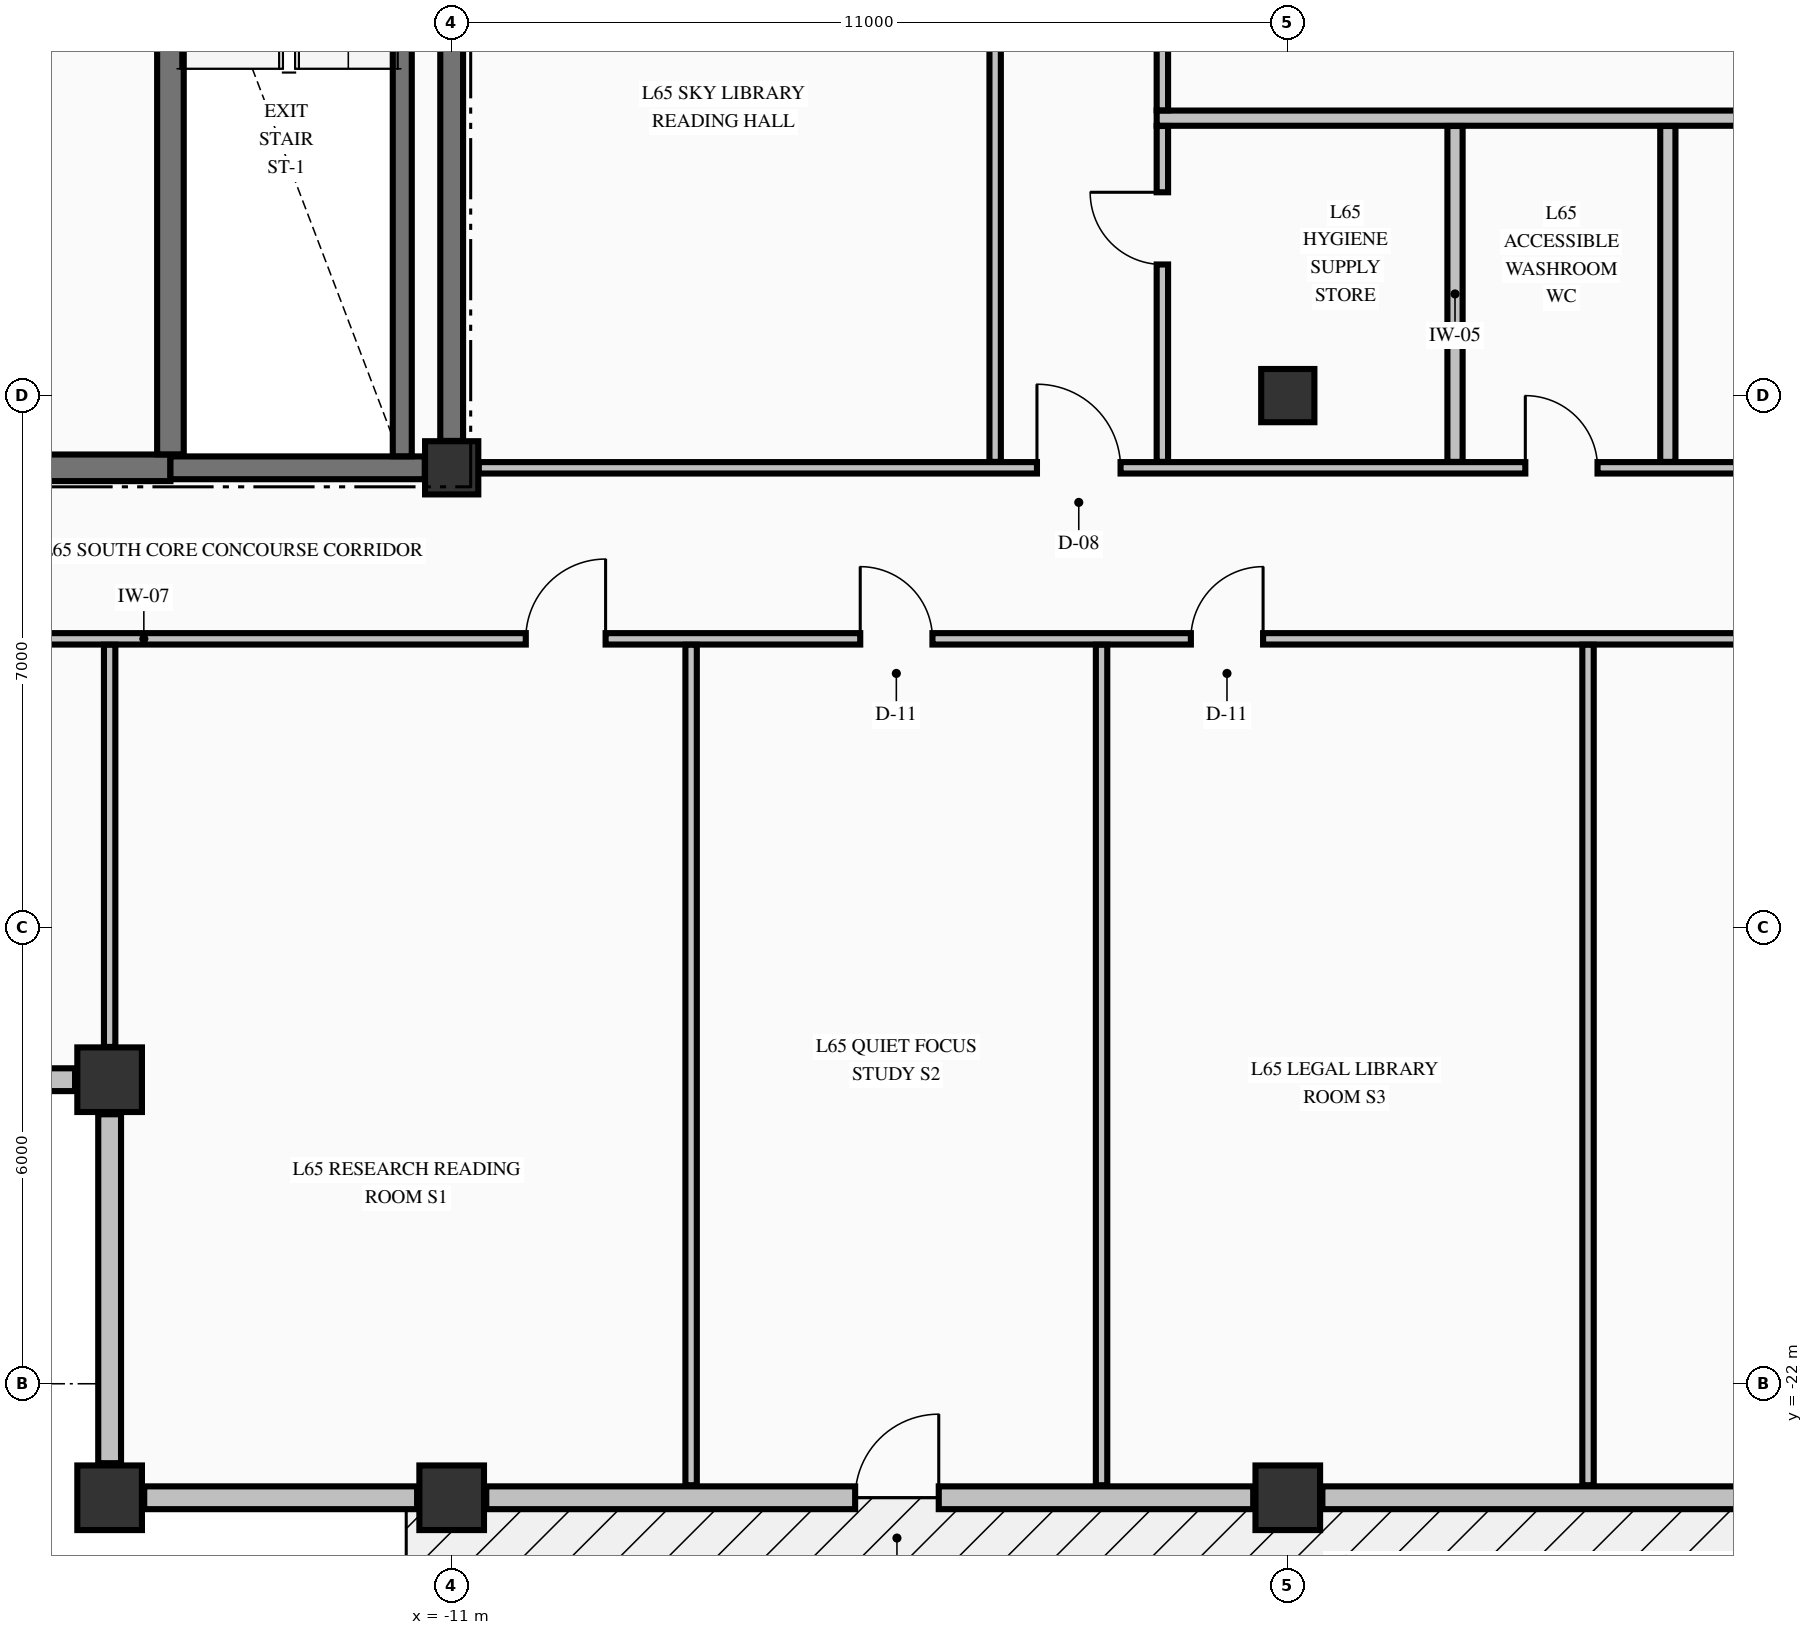
"""IFC4 building model, lengths in metres.
Left out: names, types, materials, properties, quantities, classifications, styles, units other than length and angle.
Written with IfcOpenShell. Run it as: python <this file> out.ifc"""

import sys

from ifc_helpers import new_model, si_unit, direction, frame, frame_2d, origin, origin_2d, place, context, subcontext, project, spatial, rectangle, extrude, element, fill, save


model = new_model("IFC4")
c1 = context("Model", 3, precision=1e-05, world=origin(), true_north=direction((0.0, 1.0)))
c2 = subcontext(c1, "Body", "Model", "MODEL_VIEW")
j1 = project(units=[si_unit("LENGTHUNIT", "METRE"), si_unit("PLANEANGLEUNIT", "RADIAN")], contexts=[c1])
p1 = place(None, origin())
s1 = spatial("IfcSite", under=j1, at=p1, CompositionType="ELEMENT")
p2 = place(p1, origin())
s2 = spatial("IfcBuilding", under=s1, at=p2, CompositionType="ELEMENT")
p3 = place(p2, frame((0.0, 0.0, 246.2)))
s3 = spatial("IfcBuildingStorey", under=s2, at=p3, CompositionType="ELEMENT", Elevation=246.2)
for number, where, z_axis, x_axis in (
    (1, (-15.5, -23.5, -0.25), (0.0, 0.0, 1.0), (1.0, 0.0, 0.0)),
    (2, (-11.0, -23.5, -0.25), (0.0, 0.0, 1.0), (1.0, 0.0, 0.0)),
    (3, (0.0, -23.5, -0.25), (0.0, 0.0, 1.0), (1.0, 0.0, 0.0)),
    (4, (-15.5, -18.0, -0.25), (0.0, 0.0, 1.0), (1.0, 0.0, 0.0)),
):
    element("IfcColumn", number, at=place(p3, frame(where, z_axis=z_axis, x_axis=x_axis)), inside=s3, PredefinedType="COLUMN", context=c2, shape_type="SweptSolid", body=[
        extrude(rectangle(XDim=0.85, YDim=0.85, at=origin_2d()), origin(), (0.0, 0.0, 1.0), 3.055),
    ])
for number, where, z_axis, x_axis in (
    (5, (-11.0, -9.95, -0.25), (0.0, 0.0, 1.0), (1.0, 0.0, 0.0)),
    (6, (0.0, -9.0, -0.25), (0.0, 0.0, 1.0), (1.0, 0.0, 0.0)),
):
    element("IfcColumn", number, at=place(p3, frame(where, z_axis=z_axis, x_axis=x_axis)), inside=s3, PredefinedType="COLUMN", context=c2, shape_type="SweptSolid", body=[
        extrude(rectangle(XDim=0.7, YDim=0.7, at=origin_2d()), origin(), (0.0, 0.0, 1.0), 3.055),
    ])
for number, where, z_axis, x_axis in (
    (7, (-20.545, -18.0, 0.0), (0.0, 0.0, 1.0), (1.0, 0.0, 0.0)),
    (8, (-15.5, -18.455, 0.0), (0.0, 0.0, 1.0), (0.0, -1.0, 0.0)),
):
    element("IfcWall", number, at=place(p3, frame(where, z_axis=z_axis, x_axis=x_axis)), inside=s3, PredefinedType="STANDARD", context=c2, shape_type="SweptSolid", body=[
        extrude(rectangle(XDim=4.59, YDim=0.3, at=frame_2d((2.295, 0.0))), origin(), (0.0, 0.0, 1.0), 2.197),
    ])
p4 = place(p3, frame((-15.045, -23.5, 0.0), z_axis=(0.0, 0.0, 1.0), x_axis=(1.0, 0.0, 0.0)))
e9 = element("IfcWall", 9, at=p4, inside=s3, PredefinedType="STANDARD", context=c2, shape_type="SweptSolid", body=[
    extrude(rectangle(XDim=3.59, YDim=0.3, at=frame_2d((1.795, 0.0))), origin(), (0.0, 0.0, 1.0), 2.197),
])
p5 = place(p3, frame((-10.545, -23.5, 0.0), z_axis=(0.0, 0.0, 1.0), x_axis=(1.0, 0.0, 0.0)))
e10 = element("IfcWall", 10, at=p5, inside=s3, PredefinedType="STANDARD", context=c2, shape_type="SweptSolid", body=[
    extrude(rectangle(XDim=10.09, YDim=0.3, at=frame_2d((5.045, 0.0))), origin(), (0.0, 0.0, 1.0), 2.197),
])
p6 = place(p5, frame((4.853, 0.0, 0.0)))
e11 = element("IfcOpeningElement", 11, at=p6, cuts=e10, PredefinedType="OPENING", context=c2, shape_type="SweptSolid", body=[
    extrude(rectangle(XDim=1.1, YDim=2.05, at=frame_2d((0.55, 1.025))), frame((0.0, 0.16, 0.0), z_axis=(0.0, -1.0, 0.0), x_axis=(1.0, 0.0, 0.0)), (0.0, 0.0, 1.0), 0.32),
])
p7 = place(p3, frame((0.455, -23.5, 0.0), z_axis=(0.0, 0.0, 1.0), x_axis=(1.0, 0.0, 0.0)))
e12 = element("IfcWall", 12, at=p7, inside=s3, PredefinedType="STANDARD", context=c2, shape_type="SweptSolid", body=[
    extrude(rectangle(XDim=10.09, YDim=0.3, at=frame_2d((5.045, 0.0))), origin(), (0.0, 0.0, 1.0), 2.197),
])
p8 = place(p3, frame((-19.646, -9.95, 0.0), z_axis=(0.0, 0.0, 1.0), x_axis=(1.0, 0.0, 0.0)))
e13 = element("IfcWall", 13, at=p8, inside=s3, PredefinedType="SHEAR", context=c2, shape_type="SweptSolid", body=[
    extrude(rectangle(XDim=4.946, YDim=0.35, at=frame_2d((2.473, 0.0))), origin(), (0.0, 0.0, 1.0), 2.805),
])
p9 = place(p8, frame((0.821, 0.0, 0.0)))
e14 = element("IfcOpeningElement", 14, at=p9, cuts=e13, PredefinedType="OPENING", context=c2, shape_type="SweptSolid", body=[
    extrude(rectangle(XDim=1.05, YDim=2.15, at=frame_2d((0.525, 1.075))), frame((0.0, 0.185, 0.0), z_axis=(0.0, -1.0, 0.0), x_axis=(1.0, 0.0, 0.0)), (0.0, 0.0, 1.0), 0.37),
])
p10 = place(p3, frame((-14.7, -9.95, 0.0), z_axis=(0.0, 0.0, 1.0), x_axis=(1.0, 0.0, 0.0)))
e15 = element("IfcWall", 15, at=p10, inside=s3, PredefinedType="SHEAR", context=c2, shape_type="SweptSolid", body=[
    extrude(rectangle(XDim=3.346, YDim=0.3, at=frame_2d((1.673, 0.0))), origin(), (0.0, 0.0, 1.0), 2.805),
])
p11 = place(p3, frame((-20.075, -12.2, 0.0), z_axis=(0.0, 0.0, 1.0), x_axis=(1.0, 0.0, 0.0)))
e16 = element("IfcWall", 16, at=p11, inside=s3, PredefinedType="PARTITIONING", context=c2, shape_type="SweptSolid", body=[
    extrude(rectangle(XDim=45.91, YDim=0.15, at=frame_2d((22.955, 0.0))), origin(), (0.0, 0.0, 1.0), 2.805),
])
p12 = place(p11, frame((10.05, 0.0, 0.0)))
e17 = element("IfcOpeningElement", 17, at=p12, cuts=e16, PredefinedType="OPENING", context=c2, shape_type="SweptSolid", body=[
    extrude(rectangle(XDim=1.05, YDim=2.15, at=frame_2d((0.525, 1.075))), frame((0.0, 0.085, 0.0), z_axis=(0.0, -1.0, 0.0), x_axis=(1.0, 0.0, 0.0)), (0.0, 0.0, 1.0), 0.17),
])
p13 = place(p11, frame((14.45, 0.0, 0.0)))
e18 = element("IfcOpeningElement", 18, at=p13, cuts=e16, PredefinedType="OPENING", context=c2, shape_type="SweptSolid", body=[
    extrude(rectangle(XDim=0.95, YDim=2.15, at=frame_2d((0.475, 1.075))), frame((0.0, 0.085, 0.0), z_axis=(0.0, -1.0, 0.0), x_axis=(1.0, 0.0, 0.0)), (0.0, 0.0, 1.0), 0.17),
])
p14 = place(p11, frame((18.8, 0.0, 0.0)))
e19 = element("IfcOpeningElement", 19, at=p14, cuts=e16, PredefinedType="OPENING", context=c2, shape_type="SweptSolid", body=[
    extrude(rectangle(XDim=0.95, YDim=2.15, at=frame_2d((0.475, 1.075))), frame((0.0, 0.085, 0.0), z_axis=(0.0, -1.0, 0.0), x_axis=(1.0, 0.0, 0.0)), (0.0, 0.0, 1.0), 0.17),
])
p15 = place(p11, frame((28.1, 0.0, 0.0)))
e20 = element("IfcOpeningElement", 20, at=p15, cuts=e16, PredefinedType="OPENING", context=c2, shape_type="SweptSolid", body=[
    extrude(rectangle(XDim=1.05, YDim=2.15, at=frame_2d((0.525, 1.075))), frame((0.0, 0.085, 0.0), z_axis=(0.0, -1.0, 0.0), x_axis=(1.0, 0.0, 0.0)), (0.0, 0.0, 1.0), 0.17),
])
p16 = place(p11, frame((36.08, 0.0, 0.0)))
e21 = element("IfcOpeningElement", 21, at=p16, cuts=e16, PredefinedType="OPENING", context=c2, shape_type="SweptSolid", body=[
    extrude(rectangle(XDim=0.95, YDim=2.15, at=frame_2d((0.475, 1.075))), frame((0.0, 0.085, 0.0), z_axis=(0.0, -1.0, 0.0), x_axis=(1.0, 0.0, 0.0)), (0.0, 0.0, 1.0), 0.17),
])
p17 = place(p3, frame((-10.644, -9.95, 0.0), z_axis=(0.0, 0.0, 1.0), x_axis=(1.0, 0.0, 0.0)))
e22 = element("IfcWall", 22, at=p17, inside=s3, PredefinedType="PARTITIONING", context=c2, shape_type="SweptSolid", body=[
    extrude(rectangle(XDim=21.288, YDim=0.15, at=frame_2d((10.644, 0.0))), origin(), (0.0, 0.0, 1.0), 2.805),
])
p18 = place(p17, frame((7.344, 0.0, 0.0)))
e23 = element("IfcOpeningElement", 23, at=p18, cuts=e22, PredefinedType="OPENING", context=c2, shape_type="SweptSolid", body=[
    extrude(rectangle(XDim=1.1, YDim=2.15, at=frame_2d((0.55, 1.075))), frame((0.0, 0.085, 0.0), z_axis=(0.0, -1.0, 0.0), x_axis=(1.0, 0.0, 0.0)), (0.0, 0.0, 1.0), 0.17),
])
p19 = place(p17, frame((13.769, 0.0, 0.0)))
e24 = element("IfcOpeningElement", 24, at=p19, cuts=e22, PredefinedType="OPENING", context=c2, shape_type="SweptSolid", body=[
    extrude(rectangle(XDim=0.95, YDim=2.15, at=frame_2d((0.475, 1.075))), frame((0.0, 0.085, 0.0), z_axis=(0.0, -1.0, 0.0), x_axis=(1.0, 0.0, 0.0)), (0.0, 0.0, 1.0), 0.17),
])
p20 = place(p17, frame((17.994, 0.0, 0.0)))
e25 = element("IfcOpeningElement", 25, at=p20, cuts=e22, PredefinedType="OPENING", context=c2, shape_type="SweptSolid", body=[
    extrude(rectangle(XDim=0.9, YDim=2.15, at=frame_2d((0.45, 1.075))), frame((0.0, 0.085, 0.0), z_axis=(0.0, -1.0, 0.0), x_axis=(1.0, 0.0, 0.0)), (0.0, 0.0, 1.0), 0.17),
])
p21 = place(p3, frame((-1.725, -5.35, 0.0), z_axis=(0.0, 0.0, 1.0), x_axis=(1.0, 0.0, 0.0)))
e26 = element("IfcWall", 26, at=p21, inside=s3, PredefinedType="PARTITIONING", context=c2, shape_type="SweptSolid", body=[
    extrude(rectangle(XDim=12.572, YDim=0.2, at=frame_2d((6.286, 0.0))), origin(), (0.0, 0.0, 1.0), 2.805),
])
p22 = place(p3, frame((-14.7, -9.773, 0.0), z_axis=(0.0, 0.0, 1.0), x_axis=(0.0, 1.0, 0.0)))
e27 = element("IfcWall", 27, at=p22, inside=s3, PredefinedType="SHEAR", context=c2, shape_type="SweptSolid", body=[
    extrude(rectangle(XDim=9.371, YDim=0.35, at=frame_2d((4.686, 0.0))), origin(), (0.0, 0.0, 1.0), 2.805),
])
p23 = place(p3, frame((-11.65, -9.798, 0.0), z_axis=(0.0, 0.0, 1.0), x_axis=(0.0, 1.0, 0.0)))
e28 = element("IfcWall", 28, at=p23, inside=s3, PredefinedType="SOLIDWALL", context=c2, shape_type="SweptSolid", body=[
    extrude(rectangle(XDim=9.396, YDim=0.25, at=frame_2d((4.698, 0.0))), origin(), (0.0, 0.0, 1.0), 2.805),
])
p24 = place(p3, frame((-11.0, -9.596, 0.0), z_axis=(0.0, 0.0, 1.0), x_axis=(0.0, 1.0, 0.0)))
e29 = element("IfcWall", 29, at=p24, inside=s3, PredefinedType="SHEAR", context=c2, shape_type="SweptSolid", body=[
    extrude(rectangle(XDim=9.242, YDim=0.3, at=frame_2d((4.621, 0.0))), origin(), (0.0, 0.0, 1.0), 2.805),
])
p25 = place(p3, frame((-15.5, -17.569, 0.0), z_axis=(0.0, 0.0, 1.0), x_axis=(0.0, 1.0, 0.0)))
e30 = element("IfcWall", 30, at=p25, inside=s3, PredefinedType="PARTITIONING", context=c2, shape_type="SweptSolid", body=[
    extrude(rectangle(XDim=5.291, YDim=0.15, at=frame_2d((2.646, 0.0))), origin(), (0.0, 0.0, 1.0), 2.805),
])
p26 = place(p3, frame((-7.85, -23.335, 0.0), z_axis=(0.0, 0.0, 1.0), x_axis=(0.0, 1.0, 0.0)))
e31 = element("IfcWall", 31, at=p26, inside=s3, PredefinedType="PARTITIONING", context=c2, shape_type="SweptSolid", body=[
    extrude(rectangle(XDim=11.057, YDim=0.15, at=frame_2d((5.528, 0.0))), origin(), (0.0, 0.0, 1.0), 2.805),
])
p27 = place(p3, frame((-3.85, -9.872, 0.0), z_axis=(0.0, 0.0, 1.0), x_axis=(0.0, 1.0, 0.0)))
e32 = element("IfcWall", 32, at=p27, inside=s3, PredefinedType="PARTITIONING", context=c2, shape_type="SweptSolid", body=[
    extrude(rectangle(XDim=9.544, YDim=0.15, at=frame_2d((4.772, 0.0))), origin(), (0.0, 0.0, 1.0), 2.805),
])
p28 = place(p3, frame((-2.45, -23.335, 0.0), z_axis=(0.0, 0.0, 1.0), x_axis=(0.0, 1.0, 0.0)))
e33 = element("IfcWall", 33, at=p28, inside=s3, PredefinedType="PARTITIONING", context=c2, shape_type="SweptSolid", body=[
    extrude(rectangle(XDim=11.057, YDim=0.15, at=frame_2d((5.528, 0.0))), origin(), (0.0, 0.0, 1.0), 2.805),
])
p29 = place(p3, frame((-1.65, -9.872, 0.0), z_axis=(0.0, 0.0, 1.0), x_axis=(0.0, 1.0, 0.0)))
e34 = element("IfcWall", 34, at=p29, inside=s3, PredefinedType="PARTITIONING", context=c2, shape_type="SweptSolid", body=[
    extrude(rectangle(XDim=4.419, YDim=0.15, at=frame_2d((2.209, 0.0))), origin(), (0.0, 0.0, 1.0), 2.805),
])
p30 = place(p29, frame((2.597, 0.0, 0.0)))
e35 = element("IfcOpeningElement", 35, at=p30, cuts=e34, PredefinedType="OPENING", context=c2, shape_type="SweptSolid", body=[
    extrude(rectangle(XDim=0.95, YDim=2.15, at=frame_2d((0.475, 1.075))), frame((0.0, 0.085, 0.0), z_axis=(0.0, -1.0, 0.0), x_axis=(1.0, 0.0, 0.0)), (0.0, 0.0, 1.0), 0.17),
])
p31 = place(p3, frame((-1.65, -5.247, 0.0), z_axis=(0.0, 0.0, 1.0), x_axis=(0.0, 1.0, 0.0)))
e36 = element("IfcWall", 36, at=p31, inside=s3, PredefinedType="PARTITIONING", context=c2, shape_type="SweptSolid", body=[
    extrude(rectangle(XDim=4.919, YDim=0.15, at=frame_2d((2.459, 0.0))), origin(), (0.0, 0.0, 1.0), 2.805),
])
p32 = place(p3, frame((2.2, -9.872, 0.0), z_axis=(0.0, 0.0, 1.0), x_axis=(0.0, 1.0, 0.0)))
e37 = element("IfcWall", 37, at=p32, inside=s3, PredefinedType="PARTITIONING", context=c2, shape_type="SweptSolid", body=[
    extrude(rectangle(XDim=4.419, YDim=0.2, at=frame_2d((2.209, 0.0))), origin(), (0.0, 0.0, 1.0), 2.805),
])
p33 = place(p3, frame((3.95, -23.335, 0.0), z_axis=(0.0, 0.0, 1.0), x_axis=(0.0, 1.0, 0.0)))
e38 = element("IfcWall", 38, at=p33, inside=s3, PredefinedType="PARTITIONING", context=c2, shape_type="SweptSolid", body=[
    extrude(rectangle(XDim=11.057, YDim=0.15, at=frame_2d((5.528, 0.0))), origin(), (0.0, 0.0, 1.0), 2.805),
])
p34 = place(p3, frame((5.0, -9.872, 0.0), z_axis=(0.0, 0.0, 1.0), x_axis=(0.0, 1.0, 0.0)))
e39 = element("IfcWall", 39, at=p34, inside=s3, PredefinedType="PARTITIONING", context=c2, shape_type="SweptSolid", body=[
    extrude(rectangle(XDim=4.419, YDim=0.2, at=frame_2d((2.209, 0.0))), origin(), (0.0, 0.0, 1.0), 2.805),
])
p35 = place(p6, origin())
e40 = element("IfcDoor", 40, at=p35, inside=s3, OperationType="SINGLE_SWING_RIGHT", PredefinedType="DOOR", context=c2, shape_type="SweptSolid", body=[
    extrude(rectangle(XDim=1.1, YDim=2.05, at=frame_2d((0.55, 1.025))), frame((0.0, 0.025, 0.0), z_axis=(0.0, -1.0, 0.0), x_axis=(1.0, 0.0, 0.0)), (0.0, 0.0, 1.0), 0.05),
])
fill(e11, e40)
p36 = place(p18, origin())
e41 = element("IfcDoor", 41, at=p36, inside=s3, OperationType="SINGLE_SWING_LEFT", PredefinedType="DOOR", context=c2, shape_type="SweptSolid", body=[
    extrude(rectangle(XDim=1.1, YDim=2.15, at=frame_2d((0.55, 1.075))), frame((0.0, 0.025, 0.0), z_axis=(0.0, -1.0, 0.0), x_axis=(1.0, 0.0, 0.0)), (0.0, 0.0, 1.0), 0.05),
])
fill(e23, e41)
p37 = place(p12, origin())
e42 = element("IfcDoor", 42, at=p37, inside=s3, OperationType="SINGLE_SWING_RIGHT", PredefinedType="DOOR", context=c2, shape_type="SweptSolid", body=[
    extrude(rectangle(XDim=1.05, YDim=2.15, at=frame_2d((0.525, 1.075))), frame((0.0, 0.025, 0.0), z_axis=(0.0, -1.0, 0.0), x_axis=(1.0, 0.0, 0.0)), (0.0, 0.0, 1.0), 0.05),
])
fill(e17, e42)
p38 = place(p13, origin())
e43 = element("IfcDoor", 43, at=p38, inside=s3, OperationType="SINGLE_SWING_LEFT", PredefinedType="DOOR", context=c2, shape_type="SweptSolid", body=[
    extrude(rectangle(XDim=0.95, YDim=2.15, at=frame_2d((0.475, 1.075))), frame((0.0, 0.025, 0.0), z_axis=(0.0, -1.0, 0.0), x_axis=(1.0, 0.0, 0.0)), (0.0, 0.0, 1.0), 0.05),
])
fill(e18, e43)
p39 = place(p14, origin())
e44 = element("IfcDoor", 44, at=p39, inside=s3, OperationType="SINGLE_SWING_RIGHT", PredefinedType="DOOR", context=c2, shape_type="SweptSolid", body=[
    extrude(rectangle(XDim=0.95, YDim=2.15, at=frame_2d((0.475, 1.075))), frame((0.0, 0.025, 0.0), z_axis=(0.0, -1.0, 0.0), x_axis=(1.0, 0.0, 0.0)), (0.0, 0.0, 1.0), 0.05),
])
fill(e19, e44)
p40 = place(p30, origin())
e45 = element("IfcDoor", 45, at=p40, inside=s3, OperationType="SINGLE_SWING_RIGHT", PredefinedType="DOOR", context=c2, shape_type="SweptSolid", body=[
    extrude(rectangle(XDim=0.95, YDim=2.15, at=frame_2d((0.475, 1.075))), frame((0.0, 0.025, 0.0), z_axis=(0.0, -1.0, 0.0), x_axis=(1.0, 0.0, 0.0)), (0.0, 0.0, 1.0), 0.05),
])
fill(e35, e45)
p41 = place(p19, origin())
e46 = element("IfcDoor", 46, at=p41, inside=s3, OperationType="SINGLE_SWING_LEFT", PredefinedType="DOOR", context=c2, shape_type="SweptSolid", body=[
    extrude(rectangle(XDim=0.95, YDim=2.15, at=frame_2d((0.475, 1.075))), frame((0.0, 0.025, 0.0), z_axis=(0.0, -1.0, 0.0), x_axis=(1.0, 0.0, 0.0)), (0.0, 0.0, 1.0), 0.05),
])
fill(e24, e46)
save(model, sys.argv[1])
